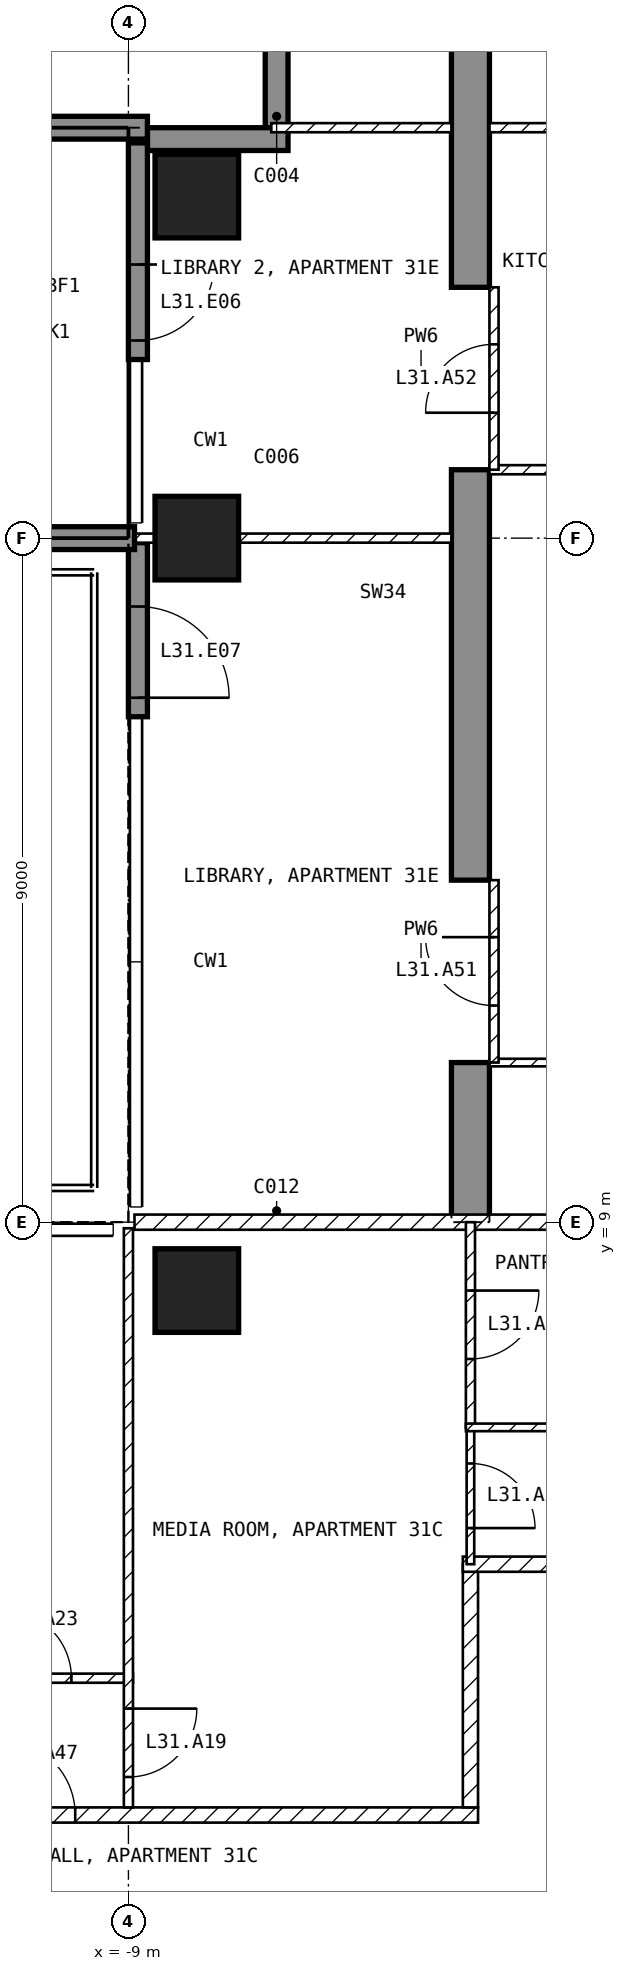
"""IFC4 building model, lengths in metres.
Left out: names, types, materials, properties, quantities, classifications, styles, units other than length and angle.
Written with IfcOpenShell. Run it as: python <this file> out.ifc"""

import sys

from ifc_helpers import new_model, si_unit, direction, frame, frame_2d, origin, origin_2d, place, context, subcontext, project, spatial, polyline, rectangle, outline, extrude, element, fill, save


model = new_model("IFC4")
c1 = context("Model", 3, precision=1e-05, world=origin(), true_north=direction((0.0, 1.0)))
c2 = subcontext(c1, "Body", "Model", "MODEL_VIEW")
j1 = project(units=[si_unit("LENGTHUNIT", "METRE"), si_unit("PLANEANGLEUNIT", "RADIAN")], contexts=[c1])
p1 = place(None, origin())
s1 = spatial("IfcSite", under=j1, at=p1, CompositionType="ELEMENT")
p2 = place(p1, origin())
s2 = spatial("IfcBuilding", under=s1, at=p2, CompositionType="ELEMENT")
p3 = place(p2, frame((0.0, 0.0, 130.4)))
s3 = spatial("IfcBuildingStorey", under=s2, at=p3, CompositionType="ELEMENT", Elevation=130.4)
for number, where, z_axis, x_axis in (
    (1, (-8.1, 8.1, -0.25), (0.0, 0.0, 1.0), (1.0, 0.0, 0.0)),
    (2, (-8.1, 18.0, -0.25), (0.0, 0.0, 1.0), (1.0, 0.0, 0.0)),
    (3, (-8.1, 22.5, -0.25), (0.0, 0.0, 1.0), (1.0, 0.0, 0.0)),
):
    element("IfcColumn", number, at=place(p3, frame(where, z_axis=z_axis, x_axis=x_axis)), inside=s3, PredefinedType="COLUMN", context=c2, shape_type="SweptSolid", body=[
        extrude(rectangle(XDim=1.1, YDim=1.1, at=origin_2d()), origin(), (0.0, 0.0, 1.0), 3.5),
    ])
p4 = place(p3, frame((-4.75, 9.0, -0.25), z_axis=(1.0, 0.0, 0.0), x_axis=(0.0, 1.0, 0.0)))
e4 = element("IfcWall", 4, at=p4, inside=s3, PredefinedType="SHEAR", context=c2, shape_type="SweptSolid", body=[
    extrude(outline(polyline([(0.0, 0.0), (2.1, 0.0), (2.1, 2.65), (4.5, 2.65), (4.5, 0.0), (9.9, 0.0), (9.9, 2.65), (12.3, 2.65), (12.3, 0.0), (16.55, 0.0), (16.55, 3.5), (0.0, 3.5), (0.0, 0.0)])), origin(), (0.0, 0.0, 1.0), 0.5),
])
p5 = place(p3, frame((-8.875, 23.2, 0.0), z_axis=(0.0, 0.0, 1.0), x_axis=(0.0, -1.0, 0.0)))
e5 = element("IfcWall", 5, at=p5, inside=s3, PredefinedType="SOLIDWALL", context=c2, shape_type="SweptSolid", body=[
    extrude(rectangle(XDim=2.85, YDim=0.25, at=frame_2d((1.425, 0.0))), origin(), (0.0, 0.0, 1.0), 3.25),
])
p6 = place(p5, frame((1.6, 0.0, 0.0)))
e6 = element("IfcOpeningElement", 6, at=p6, cuts=e5, PredefinedType="OPENING", context=c2, shape_type="SweptSolid", body=[
    extrude(rectangle(XDim=1.0, YDim=2.4, at=frame_2d((0.5, 1.2))), frame((0.0, 0.135, 0.0), z_axis=(0.0, -1.0, 0.0), x_axis=(1.0, 0.0, 0.0)), (0.0, 0.0, 1.0), 0.27),
])
p7 = place(p3, frame((-8.875, 17.94, 0.0), z_axis=(0.0, 0.0, 1.0), x_axis=(0.0, -1.0, 0.0)))
e7 = element("IfcWall", 7, at=p7, inside=s3, PredefinedType="SOLIDWALL", context=c2, shape_type="SweptSolid", body=[
    extrude(rectangle(XDim=2.29, YDim=0.25, at=frame_2d((1.145, 0.0))), origin(), (0.0, 0.0, 1.0), 3.25),
])
p8 = place(p7, frame((0.84, 0.0, 0.0)))
e8 = element("IfcOpeningElement", 8, at=p8, cuts=e7, PredefinedType="OPENING", context=c2, shape_type="SweptSolid", body=[
    extrude(rectangle(XDim=1.2, YDim=2.4, at=frame_2d((0.6, 1.2))), frame((0.0, 0.135, 0.0), z_axis=(0.0, -1.0, 0.0), x_axis=(1.0, 0.0, 0.0)), (0.0, 0.0, 1.0), 0.27),
])
p9 = place(p3, frame((-7.05, 25.2, 0.0), z_axis=(0.0, 0.0, 1.0), x_axis=(0.0, -1.0, 0.0)))
e9 = element("IfcWall", 9, at=p9, inside=s3, PredefinedType="SOLIDWALL", context=c2, shape_type="SweptSolid", body=[
    extrude(rectangle(XDim=1.8, YDim=0.3, at=frame_2d((0.9, 0.0))), origin(), (0.0, 0.0, 1.0), 3.25),
])
p10 = place(p3, frame((-6.9, 23.25, 0.0), z_axis=(0.0, 0.0, 1.0), x_axis=(-1.0, 0.0, 0.0)))
e10 = element("IfcWall", 10, at=p10, inside=s3, PredefinedType="SOLIDWALL", context=c2, shape_type="SweptSolid", body=[
    extrude(rectangle(XDim=1.85, YDim=0.3, at=frame_2d((0.925, 0.0))), origin(), (0.0, 0.0, 1.0), 3.25),
])
p11 = place(p3, frame((-8.92, 18.0, 0.0), z_axis=(0.0, 0.0, 1.0), x_axis=(-1.0, 0.0, 0.0)))
e11 = element("IfcWall", 11, at=p11, inside=s3, PredefinedType="SOLIDWALL", context=c2, shape_type="SweptSolid", body=[
    extrude(rectangle(XDim=2.82, YDim=0.3, at=frame_2d((1.41, 0.0))), origin(), (0.0, 0.0, 1.0), 3.25),
])
p12 = place(p3, frame((-8.75, 23.4, 0.0), z_axis=(0.0, 0.0, 1.0), x_axis=(-1.0, 0.0, 0.0)))
e12 = element("IfcWall", 12, at=p12, inside=s3, PredefinedType="SOLIDWALL", context=c2, shape_type="SweptSolid", body=[
    extrude(rectangle(XDim=2.95, YDim=0.3, at=frame_2d((1.475, 0.0))), origin(), (0.0, 0.0, 1.0), 3.25),
])
p13 = place(p3, frame((-21.6, 1.2, 0.0), z_axis=(0.0, 0.0, 1.0), x_axis=(1.0, 0.0, 0.0)))
e13 = element("IfcWall", 13, at=p13, inside=s3, PredefinedType="PARTITIONING", context=c2, shape_type="SweptSolid", body=[
    extrude(rectangle(XDim=17.2, YDim=0.2, at=frame_2d((8.6, 0.0))), origin(), (0.0, 0.0, 1.0), 3.25),
])
p14 = place(p13, frame((10.9, 0.0, 0.0)))
e14 = element("IfcOpeningElement", 14, at=p14, cuts=e13, PredefinedType="OPENING", context=c2, shape_type="SweptSolid", body=[
    extrude(rectangle(XDim=1.0, YDim=2.1, at=frame_2d((0.5, 1.05))), frame((0.0, 0.11, 0.0), z_axis=(0.0, -1.0, 0.0), x_axis=(1.0, 0.0, 0.0)), (0.0, 0.0, 1.0), 0.22),
])
p15 = place(p3, frame((-4.5, 1.3, 0.0), z_axis=(0.0, 0.0, 1.0), x_axis=(0.0, 1.0, 0.0)))
e15 = element("IfcWall", 15, at=p15, inside=s3, PredefinedType="PARTITIONING", context=c2, shape_type="SweptSolid", body=[
    extrude(rectangle(XDim=3.2, YDim=0.2, at=frame_2d((1.6, 0.0))), origin(), (0.0, 0.0, 1.0), 3.25),
])
p16 = place(p3, frame((-4.6, 4.5, 0.0), z_axis=(0.0, 0.0, 1.0), x_axis=(1.0, 0.0, 0.0)))
e16 = element("IfcWall", 16, at=p16, inside=s3, PredefinedType="PARTITIONING", context=c2, shape_type="SweptSolid", body=[
    extrude(rectangle(XDim=3.5, YDim=0.2, at=frame_2d((1.75, 0.0))), origin(), (0.0, 0.0, 1.0), 3.25),
])
p17 = place(p3, frame((-8.92, 9.0, 0.0), z_axis=(0.0, 0.0, 1.0), x_axis=(1.0, 0.0, 0.0)))
e17 = element("IfcWall", 17, at=p17, inside=s3, PredefinedType="PARTITIONING", context=c2, shape_type="SweptSolid", body=[
    extrude(rectangle(XDim=17.84, YDim=0.2, at=frame_2d((8.92, 0.0))), origin(), (0.0, 0.0, 1.0), 3.25),
])
p18 = place(p17, frame((8.42, 0.0, 0.0)))
e18 = element("IfcOpeningElement", 18, at=p18, cuts=e17, PredefinedType="OPENING", context=c2, shape_type="SweptSolid", body=[
    extrude(rectangle(XDim=1.0, YDim=2.1, at=frame_2d((0.5, 1.05))), frame((0.0, 0.11, 0.0), z_axis=(0.0, -1.0, 0.0), x_axis=(1.0, 0.0, 0.0)), (0.0, 0.0, 1.0), 0.22),
])
p19 = place(p3, frame((-14.4, 3.0, 0.0), z_axis=(0.0, 0.0, 1.0), x_axis=(1.0, 0.0, 0.0)))
e19 = element("IfcWall", 19, at=p19, inside=s3, PredefinedType="PARTITIONING", context=c2, shape_type="SweptSolid", body=[
    extrude(rectangle(XDim=5.46, YDim=0.12, at=frame_2d((2.73, 0.0))), origin(), (0.0, 0.0, 1.0), 3.25),
])
p20 = place(p19, frame((3.75, 0.0, 0.0)))
e20 = element("IfcOpeningElement", 20, at=p20, cuts=e19, PredefinedType="OPENING", context=c2, shape_type="SweptSolid", body=[
    extrude(rectangle(XDim=0.9, YDim=2.1, at=frame_2d((0.45, 1.05))), frame((0.0, 0.07, 0.0), z_axis=(0.0, -1.0, 0.0), x_axis=(1.0, 0.0, 0.0)), (0.0, 0.0, 1.0), 0.14),
])
p21 = place(p3, frame((-9.0, 8.92, 0.0), z_axis=(0.0, 0.0, 1.0), x_axis=(0.0, -1.0, 0.0)))
e21 = element("IfcWall", 21, at=p21, inside=s3, PredefinedType="PARTITIONING", context=c2, shape_type="SweptSolid", body=[
    extrude(rectangle(XDim=7.62, YDim=0.12, at=frame_2d((3.81, 0.0))), origin(), (0.0, 0.0, 1.0), 3.25),
])
p22 = place(p21, frame((6.32, 0.0, 0.0)))
e22 = element("IfcOpeningElement", 22, at=p22, cuts=e21, PredefinedType="OPENING", context=c2, shape_type="SweptSolid", body=[
    extrude(rectangle(XDim=0.9, YDim=2.1, at=frame_2d((0.45, 1.05))), frame((0.0, 0.07, 0.0), z_axis=(0.0, -1.0, 0.0), x_axis=(1.0, 0.0, 0.0)), (0.0, 0.0, 1.0), 0.14),
])
p23 = place(p3, frame((-4.5, 6.3, 0.0), z_axis=(0.0, 0.0, 1.0), x_axis=(0.0, -1.0, 0.0)))
e23 = element("IfcWall", 23, at=p23, inside=s3, PredefinedType="PARTITIONING", context=c2, shape_type="SweptSolid", body=[
    extrude(rectangle(XDim=1.8, YDim=0.1, at=frame_2d((0.9, 0.0))), origin(), (0.0, 0.0, 1.0), 3.25),
])
p24 = place(p23, frame((0.475, 0.0, 0.0)))
e24 = element("IfcOpeningElement", 24, at=p24, cuts=e23, PredefinedType="OPENING", context=c2, shape_type="SweptSolid", body=[
    extrude(rectangle(XDim=0.85, YDim=2.1, at=frame_2d((0.425, 1.05))), frame((0.0, 0.06, 0.0), z_axis=(0.0, -1.0, 0.0), x_axis=(1.0, 0.0, 0.0)), (0.0, 0.0, 1.0), 0.12),
])
p25 = place(p3, frame((-4.5, 9.0, 0.0), z_axis=(0.0, 0.0, 1.0), x_axis=(0.0, -1.0, 0.0)))
e25 = element("IfcWall", 25, at=p25, inside=s3, PredefinedType="PARTITIONING", context=c2, shape_type="SweptSolid", body=[
    extrude(rectangle(XDim=2.7, YDim=0.12, at=frame_2d((1.35, 0.0))), origin(), (0.0, 0.0, 1.0), 3.25),
])
p26 = place(p25, frame((0.9, 0.0, 0.0)))
e26 = element("IfcOpeningElement", 26, at=p26, cuts=e25, PredefinedType="OPENING", context=c2, shape_type="SweptSolid", body=[
    extrude(rectangle(XDim=0.9, YDim=2.1, at=frame_2d((0.45, 1.05))), frame((0.0, 0.07, 0.0), z_axis=(0.0, -1.0, 0.0), x_axis=(1.0, 0.0, 0.0)), (0.0, 0.0, 1.0), 0.14),
])
p27 = place(p3, frame((-4.56, 6.3, 0.0), z_axis=(0.0, 0.0, 1.0), x_axis=(1.0, 0.0, 0.0)))
e27 = element("IfcWall", 27, at=p27, inside=s3, PredefinedType="PARTITIONING", context=c2, shape_type="SweptSolid", body=[
    extrude(rectangle(XDim=3.46, YDim=0.1, at=frame_2d((1.73, 0.0))), origin(), (0.0, 0.0, 1.0), 3.25),
])
p28 = place(p3, frame((-4.25, 11.1, 0.0), z_axis=(0.0, 0.0, 1.0), x_axis=(1.0, 0.0, 0.0)))
e28 = element("IfcWall", 28, at=p28, inside=s3, PredefinedType="PARTITIONING", context=c2, shape_type="SweptSolid", body=[
    extrude(rectangle(XDim=2.15, YDim=0.1, at=frame_2d((1.075, 0.0))), origin(), (0.0, 0.0, 1.0), 3.25),
])
p29 = place(p3, frame((-4.25, 18.9, 0.0), z_axis=(0.0, 0.0, 1.0), x_axis=(1.0, 0.0, 0.0)))
e29 = element("IfcWall", 29, at=p29, inside=s3, PredefinedType="PARTITIONING", context=c2, shape_type="SweptSolid", body=[
    extrude(rectangle(XDim=8.5, YDim=0.12, at=frame_2d((4.25, 0.0))), origin(), (0.0, 0.0, 1.0), 3.25),
])
p30 = place(p29, frame((5.675, 0.0, 0.0)))
e30 = element("IfcOpeningElement", 30, at=p30, cuts=e29, PredefinedType="OPENING", context=c2, shape_type="SweptSolid", body=[
    extrude(rectangle(XDim=0.9, YDim=2.1, at=frame_2d((0.45, 1.05))), frame((0.0, 0.07, 0.0), z_axis=(0.0, -1.0, 0.0), x_axis=(1.0, 0.0, 0.0)), (0.0, 0.0, 1.0), 0.14),
])
p31 = place(p3, frame((-4.25, 23.4, 0.0), z_axis=(0.0, 0.0, 1.0), x_axis=(1.0, 0.0, 0.0)))
e31 = element("IfcWall", 31, at=p31, inside=s3, PredefinedType="PARTITIONING", context=c2, shape_type="SweptSolid", body=[
    extrude(rectangle(XDim=8.5, YDim=0.12, at=frame_2d((4.25, 0.0))), origin(), (0.0, 0.0, 1.0), 3.25),
])
p32 = place(p31, frame((5.675, 0.0, 0.0)))
e32 = element("IfcOpeningElement", 32, at=p32, cuts=e31, PredefinedType="OPENING", context=c2, shape_type="SweptSolid", body=[
    extrude(rectangle(XDim=0.9, YDim=2.1, at=frame_2d((0.45, 1.05))), frame((0.0, 0.07, 0.0), z_axis=(0.0, -1.0, 0.0), x_axis=(1.0, 0.0, 0.0)), (0.0, 0.0, 1.0), 0.14),
])
p33 = place(p3, frame((-8.92, 18.0, 0.0), z_axis=(0.0, 0.0, 1.0), x_axis=(1.0, 0.0, 0.0)))
e33 = element("IfcWall", 33, at=p33, inside=s3, PredefinedType="PARTITIONING", context=c2, shape_type="SweptSolid", body=[
    extrude(rectangle(XDim=4.17, YDim=0.12, at=frame_2d((2.085, 0.0))), origin(), (0.0, 0.0, 1.0), 2.414),
])
p34 = place(p3, frame((-7.12, 23.4, 0.0), z_axis=(0.0, 0.0, 1.0), x_axis=(1.0, 0.0, 0.0)))
e34 = element("IfcWall", 34, at=p34, inside=s3, PredefinedType="PARTITIONING", context=c2, shape_type="SweptSolid", body=[
    extrude(rectangle(XDim=2.37, YDim=0.12, at=frame_2d((1.185, 0.0))), origin(), (0.0, 0.0, 1.0), 3.25),
])
p35 = place(p3, frame((-4.19, 11.1, 0.0), z_axis=(0.0, 0.0, 1.0), x_axis=(0.0, 1.0, 0.0)))
e35 = element("IfcWall", 35, at=p35, inside=s3, PredefinedType="PARTITIONING", context=c2, shape_type="SweptSolid", body=[
    extrude(rectangle(XDim=2.4, YDim=0.12, at=frame_2d((1.2, 0.0))), origin(), (0.0, 0.0, 1.0), 2.4),
])
p36 = place(p35, frame((0.75, 0.0, 0.0)))
e36 = element("IfcOpeningElement", 36, at=p36, cuts=e35, PredefinedType="OPENING", context=c2, shape_type="SweptSolid", body=[
    extrude(rectangle(XDim=0.9, YDim=2.1, at=frame_2d((0.45, 1.05))), frame((0.0, 0.07, 0.0), z_axis=(0.0, -1.0, 0.0), x_axis=(1.0, 0.0, 0.0)), (0.0, 0.0, 1.0), 0.14),
])
p37 = place(p3, frame((-4.19, 18.9, 0.0), z_axis=(0.0, 0.0, 1.0), x_axis=(0.0, 1.0, 0.0)))
e37 = element("IfcWall", 37, at=p37, inside=s3, PredefinedType="PARTITIONING", context=c2, shape_type="SweptSolid", body=[
    extrude(rectangle(XDim=2.4, YDim=0.12, at=frame_2d((1.2, 0.0))), origin(), (0.0, 0.0, 1.0), 2.4),
])
p38 = place(p37, frame((0.75, 0.0, 0.0)))
e38 = element("IfcOpeningElement", 38, at=p38, cuts=e37, PredefinedType="OPENING", context=c2, shape_type="SweptSolid", body=[
    extrude(rectangle(XDim=0.9, YDim=2.1, at=frame_2d((0.45, 1.05))), frame((0.0, 0.07, 0.0), z_axis=(0.0, -1.0, 0.0), x_axis=(1.0, 0.0, 0.0)), (0.0, 0.0, 1.0), 0.14),
])
p39 = place(p6, origin())
e39 = element("IfcDoor", 39, at=p39, inside=s3, OperationType="SINGLE_SWING_LEFT", PredefinedType="DOOR", context=c2, shape_type="SweptSolid", body=[
    extrude(rectangle(XDim=1.0, YDim=2.4, at=frame_2d((0.5, 1.2))), frame((0.0, 0.025, 0.0), z_axis=(0.0, -1.0, 0.0), x_axis=(1.0, 0.0, 0.0)), (0.0, 0.0, 1.0), 0.05),
])
fill(e6, e39)
p40 = place(p8, origin())
e40 = element("IfcDoor", 40, at=p40, inside=s3, OperationType="SINGLE_SWING_RIGHT", PredefinedType="DOOR", context=c2, shape_type="SweptSolid", body=[
    extrude(rectangle(XDim=1.2, YDim=2.4, at=frame_2d((0.6, 1.2))), frame((0.0, 0.025, 0.0), z_axis=(0.0, -1.0, 0.0), x_axis=(1.0, 0.0, 0.0)), (0.0, 0.0, 1.0), 0.05),
])
fill(e8, e40)
p41 = place(p22, origin())
e41 = element("IfcDoor", 41, at=p41, inside=s3, OperationType="SINGLE_SWING_LEFT", PredefinedType="DOOR", context=c2, shape_type="SweptSolid", body=[
    extrude(rectangle(XDim=0.9, YDim=2.1, at=frame_2d((0.45, 1.05))), frame((0.0, 0.025, 0.0), z_axis=(0.0, -1.0, 0.0), x_axis=(1.0, 0.0, 0.0)), (0.0, 0.0, 1.0), 0.05),
])
fill(e22, e41)
p42 = place(p26, origin())
e42 = element("IfcDoor", 42, at=p42, inside=s3, OperationType="SINGLE_SWING_LEFT", PredefinedType="DOOR", context=c2, shape_type="SweptSolid", body=[
    extrude(rectangle(XDim=0.9, YDim=2.1, at=frame_2d((0.45, 1.05))), frame((0.0, 0.025, 0.0), z_axis=(0.0, -1.0, 0.0), x_axis=(1.0, 0.0, 0.0)), (0.0, 0.0, 1.0), 0.05),
])
fill(e26, e42)
p43 = place(p24, origin())
e43 = element("IfcDoor", 43, at=p43, inside=s3, OperationType="SINGLE_SWING_RIGHT", PredefinedType="DOOR", context=c2, shape_type="SweptSolid", body=[
    extrude(rectangle(XDim=0.85, YDim=2.1, at=frame_2d((0.425, 1.05))), frame((0.0, 0.025, 0.0), z_axis=(0.0, -1.0, 0.0), x_axis=(1.0, 0.0, 0.0)), (0.0, 0.0, 1.0), 0.05),
])
fill(e24, e43)
p44 = place(p20, origin())
e44 = element("IfcDoor", 44, at=p44, inside=s3, OperationType="SINGLE_SWING_LEFT", PredefinedType="DOOR", context=c2, shape_type="SweptSolid", body=[
    extrude(rectangle(XDim=0.9, YDim=2.1, at=frame_2d((0.45, 1.05))), frame((0.0, 0.025, 0.0), z_axis=(0.0, -1.0, 0.0), x_axis=(1.0, 0.0, 0.0)), (0.0, 0.0, 1.0), 0.05),
])
fill(e20, e44)
p45 = place(p14, origin())
e45 = element("IfcDoor", 45, at=p45, inside=s3, OperationType="SINGLE_SWING_LEFT", PredefinedType="DOOR", context=c2, shape_type="SweptSolid", body=[
    extrude(rectangle(XDim=1.0, YDim=2.1, at=frame_2d((0.5, 1.05))), frame((0.0, 0.025, 0.0), z_axis=(0.0, -1.0, 0.0), x_axis=(1.0, 0.0, 0.0)), (0.0, 0.0, 1.0), 0.05),
])
fill(e14, e45)
p46 = place(p36, origin())
e46 = element("IfcDoor", 46, at=p46, inside=s3, OperationType="SINGLE_SWING_RIGHT", PredefinedType="DOOR", context=c2, shape_type="SweptSolid", body=[
    extrude(rectangle(XDim=0.9, YDim=2.1, at=frame_2d((0.45, 1.05))), frame((0.0, 0.025, 0.0), z_axis=(0.0, -1.0, 0.0), x_axis=(1.0, 0.0, 0.0)), (0.0, 0.0, 1.0), 0.05),
])
fill(e36, e46)
p47 = place(p38, origin())
e47 = element("IfcDoor", 47, at=p47, inside=s3, OperationType="SINGLE_SWING_LEFT", PredefinedType="DOOR", context=c2, shape_type="SweptSolid", body=[
    extrude(rectangle(XDim=0.9, YDim=2.1, at=frame_2d((0.45, 1.05))), frame((0.0, 0.025, 0.0), z_axis=(0.0, -1.0, 0.0), x_axis=(1.0, 0.0, 0.0)), (0.0, 0.0, 1.0), 0.05),
])
fill(e38, e47)
save(model, sys.argv[1])
